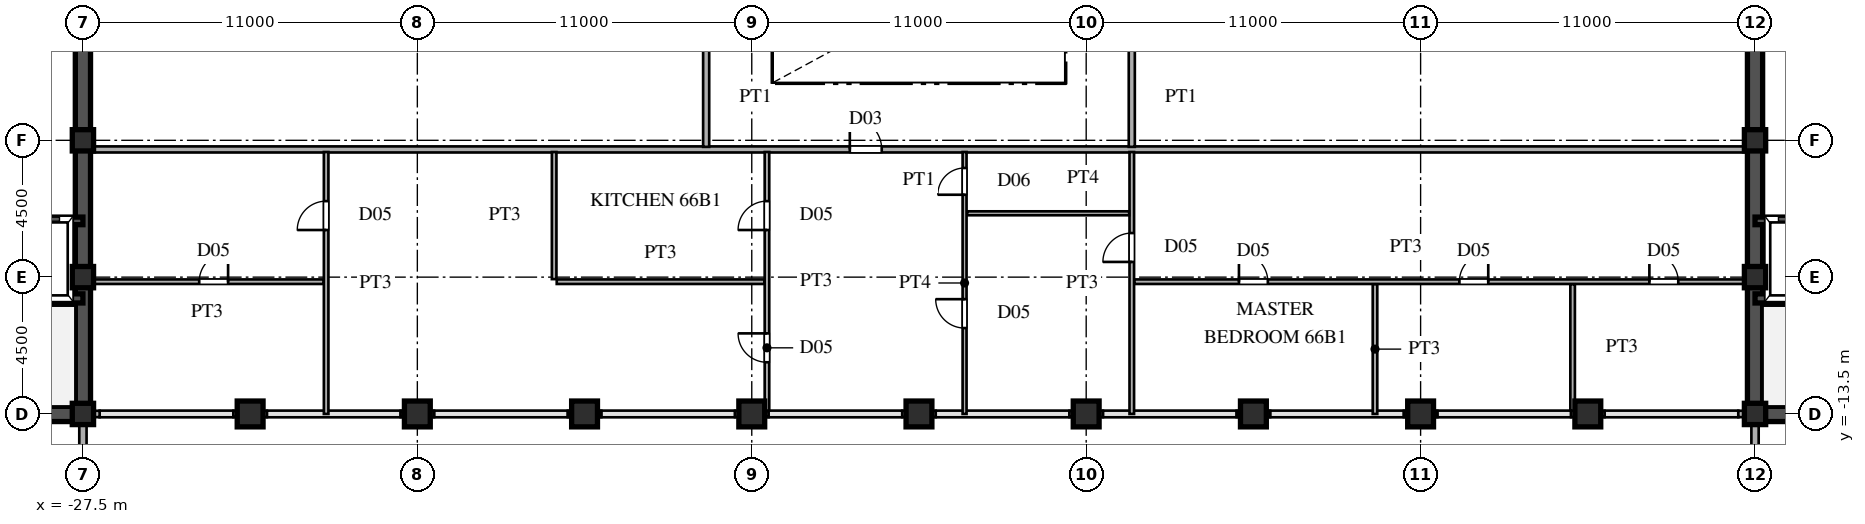
"""IFC4 building model, lengths in metres.
Left out: names, types, materials, properties, quantities, classifications, styles, units other than length and angle.
Written with IfcOpenShell. Run it as: python <this file> out.ifc"""

import sys

from ifc_helpers import new_model, si_unit, direction, frame, frame_2d, origin, origin_2d, place, context, subcontext, project, spatial, rectangle, hollow_rectangle, extrude, source, transform, mapped, element, fill, save


model = new_model("IFC4")
c1 = context("Model", 3, precision=1e-05, world=origin(), true_north=direction((0.0, 1.0)))
c2 = subcontext(c1, "Body", "Model", "MODEL_VIEW")
j1 = project(units=[si_unit("LENGTHUNIT", "METRE"), si_unit("PLANEANGLEUNIT", "RADIAN")], contexts=[c1])
p1 = place(None, origin())
s1 = spatial("IfcSite", under=j1, at=p1, CompositionType="ELEMENT")
p2 = place(p1, origin())
s2 = spatial("IfcBuilding", under=s1, at=p2, CompositionType="ELEMENT")
p3 = place(p2, frame((0.0, 0.0, 250.65)))
s3 = spatial("IfcBuildingStorey", under=s2, at=p3, CompositionType="ELEMENT", Elevation=250.65)
m1 = source(origin(), c2, "Body", "SweptSolid", [
    extrude(hollow_rectangle(XDim=0.7, YDim=0.7, WallThickness=0.03, at=origin_2d()), origin(), (0.0, 0.0, 1.0), 3.75),
])
for number, where, z_axis, x_axis in (
    (1, (-27.5, -13.5, 0.0), (0.0, 0.0, 1.0), (1.0, 0.0, 0.0)),
    (2, (-27.5, -9.0, 0.0), (0.0, 0.0, 1.0), (1.0, 0.0, 0.0)),
    (3, (-27.5, -4.5, 0.0), (0.0, 0.0, 1.0), (1.0, 0.0, 0.0)),
    (4, (27.5, -13.5, 0.0), (0.0, 0.0, 1.0), (1.0, 0.0, 0.0)),
    (5, (27.5, -9.0, 0.0), (0.0, 0.0, 1.0), (1.0, 0.0, 0.0)),
    (6, (27.5, -4.5, 0.0), (0.0, 0.0, 1.0), (1.0, 0.0, 0.0)),
):
    element("IfcColumn", number, at=place(p3, frame(where, z_axis=z_axis, x_axis=x_axis)), inside=s3, PredefinedType="COLUMN", context=c2, shape_type="MappedRepresentation", body=[
        mapped(m1, transform((0.0, 0.0, 0.0), scale=1.0)),
    ])
m2 = source(origin(), c2, "Body", "SweptSolid", [
    extrude(hollow_rectangle(XDim=0.85, YDim=0.85, WallThickness=0.036, at=origin_2d()), origin(), (0.0, 0.0, 1.0), 3.75),
])
for number, where, z_axis, x_axis in (
    (7, (-22.0, -13.5, 0.0), (0.0, 0.0, 1.0), (1.0, 0.0, 0.0)),
    (8, (-16.5, -13.5, 0.0), (0.0, 0.0, 1.0), (1.0, 0.0, 0.0)),
    (9, (-11.0, -13.5, 0.0), (0.0, 0.0, 1.0), (1.0, 0.0, 0.0)),
    (10, (-5.5, -13.5, 0.0), (0.0, 0.0, 1.0), (1.0, 0.0, 0.0)),
    (11, (0.0, -13.5, 0.0), (0.0, 0.0, 1.0), (1.0, 0.0, 0.0)),
    (12, (5.5, -13.5, 0.0), (0.0, 0.0, 1.0), (1.0, 0.0, 0.0)),
    (13, (11.0, -13.5, 0.0), (0.0, 0.0, 1.0), (1.0, 0.0, 0.0)),
    (14, (16.5, -13.5, 0.0), (0.0, 0.0, 1.0), (1.0, 0.0, 0.0)),
    (15, (22.0, -13.5, 0.0), (0.0, 0.0, 1.0), (1.0, 0.0, 0.0)),
):
    element("IfcColumn", number, at=place(p3, frame(where, z_axis=z_axis, x_axis=x_axis)), inside=s3, PredefinedType="COLUMN", context=c2, shape_type="MappedRepresentation", body=[
        mapped(m2, transform((0.0, 0.0, 0.0), scale=1.0)),
    ])
p4 = place(p3, frame((-27.5, -15.98, 0.0), z_axis=(0.0, 0.0, 1.0), x_axis=(0.0, 1.0, 0.0)))
e16 = element("IfcWall", 16, at=p4, inside=s3, PredefinedType="SOLIDWALL", context=c2, shape_type="SweptSolid", body=[
    extrude(rectangle(XDim=1.605, YDim=0.24, at=frame_2d((0.803, 0.0))), origin(), (0.0, 0.0, 1.0), 3.53),
])
p5 = place(p3, frame((-27.5, -14.375, 0.0), z_axis=(0.0, 0.0, 1.0), x_axis=(0.0, 1.0, 0.0)))
e17 = element("IfcWall", 17, at=p5, inside=s3, PredefinedType="SOLIDWALL", context=c2, shape_type="SweptSolid", body=[
    extrude(rectangle(XDim=0.62, YDim=0.24, at=frame_2d((0.31, 0.0))), origin(), (0.0, 0.0, 1.0), 3.03),
])
p6 = place(p3, frame((27.5, -15.98, 0.0), z_axis=(0.0, 0.0, 1.0), x_axis=(0.0, 1.0, 0.0)))
e18 = element("IfcWall", 18, at=p6, inside=s3, PredefinedType="SOLIDWALL", context=c2, shape_type="SweptSolid", body=[
    extrude(rectangle(XDim=1.605, YDim=0.24, at=frame_2d((0.803, 0.0))), origin(), (0.0, 0.0, 1.0), 3.53),
])
p7 = place(p3, frame((27.5, -14.375, 0.0), z_axis=(0.0, 0.0, 1.0), x_axis=(0.0, 1.0, 0.0)))
e19 = element("IfcWall", 19, at=p7, inside=s3, PredefinedType="SOLIDWALL", context=c2, shape_type="SweptSolid", body=[
    extrude(rectangle(XDim=0.62, YDim=0.24, at=frame_2d((0.31, 0.0))), origin(), (0.0, 0.0, 1.0), 3.03),
])
p8 = place(p3, frame((-27.49, -13.5, 0.0), z_axis=(0.0, 0.0, 1.0), x_axis=(1.0, 0.0, 0.0)))
e20 = element("IfcWall", 20, at=p8, inside=s3, PredefinedType="SOLIDWALL", context=c2, shape_type="SweptSolid", body=[
    extrude(rectangle(XDim=0.54, YDim=0.21, at=frame_2d((0.27, 0.0))), origin(), (0.0, 0.0, 1.0), 3.03),
])
for number, where, z_axis, x_axis in (
    (21, (-22.55, -13.5, 0.0), (0.0, 0.0, 1.0), (1.0, 0.0, 0.0)),
    (22, (-17.05, -13.5, 0.0), (0.0, 0.0, 1.0), (1.0, 0.0, 0.0)),
    (23, (-11.55, -13.5, 0.0), (0.0, 0.0, 1.0), (1.0, 0.0, 0.0)),
    (24, (-6.05, -13.5, 0.0), (0.0, 0.0, 1.0), (1.0, 0.0, 0.0)),
    (25, (-0.55, -13.5, 0.0), (0.0, 0.0, 1.0), (1.0, 0.0, 0.0)),
    (26, (4.95, -13.5, 0.0), (0.0, 0.0, 1.0), (1.0, 0.0, 0.0)),
    (27, (10.45, -13.5, 0.0), (0.0, 0.0, 1.0), (1.0, 0.0, 0.0)),
    (28, (15.95, -13.5, 0.0), (0.0, 0.0, 1.0), (1.0, 0.0, 0.0)),
    (29, (21.45, -13.5, 0.0), (0.0, 0.0, 1.0), (1.0, 0.0, 0.0)),
):
    element("IfcWall", number, at=place(p3, frame(where, z_axis=z_axis, x_axis=x_axis)), inside=s3, PredefinedType="SOLIDWALL", context=c2, shape_type="SweptSolid", body=[
        extrude(rectangle(XDim=1.1, YDim=0.21, at=frame_2d((0.55, 0.0))), origin(), (0.0, 0.0, 1.0), 3.03),
    ])
p9 = place(p3, frame((26.95, -13.5, 0.0), z_axis=(0.0, 0.0, 1.0), x_axis=(1.0, 0.0, 0.0)))
e30 = element("IfcWall", 30, at=p9, inside=s3, PredefinedType="SOLIDWALL", context=c2, shape_type="SweptSolid", body=[
    extrude(rectangle(XDim=0.54, YDim=0.21, at=frame_2d((0.27, 0.0))), origin(), (0.0, 0.0, 1.0), 3.03),
])
p10 = place(p3, frame((-27.5, -13.5, 0.0), z_axis=(0.0, 0.0, 1.0), x_axis=(0.0, 1.0, 0.0)))
e31 = element("IfcWall", 31, at=p10, inside=s3, PredefinedType="SHEAR", context=c2, shape_type="SweptSolid", body=[
    extrude(rectangle(XDim=12.2, YDim=0.5, at=frame_2d((6.1, 0.0))), origin(), (0.0, 0.0, 1.0), 3.53),
])
p11 = place(p3, frame((-36.5, -13.5, 0.0), z_axis=(0.0, 0.0, 1.0), x_axis=(1.0, 0.0, 0.0)))
e32 = element("IfcWall", 32, at=p11, inside=s3, PredefinedType="SHEAR", context=c2, shape_type="SweptSolid", body=[
    extrude(rectangle(XDim=9.0, YDim=0.5, at=frame_2d((4.5, 0.0))), origin(), (0.0, 0.0, 1.0), 3.53),
])
p12 = place(p3, frame((-36.5, -9.7, 0.0), z_axis=(0.0, 0.0, 1.0), x_axis=(1.0, 0.0, 0.0)))
e33 = element("IfcWall", 33, at=p12, inside=s3, PredefinedType="SHEAR", context=c2, shape_type="SweptSolid", body=[
    extrude(rectangle(XDim=9.0, YDim=0.3, at=frame_2d((4.5, 0.0))), origin(), (0.0, 0.0, 1.0), 3.53),
])
p13 = place(p12, frame((0.6, 0.0, 0.0)))
e34 = element("IfcOpeningElement", 34, at=p13, cuts=e33, PredefinedType="OPENING", context=c2, shape_type="SweptSolid", body=[
    extrude(rectangle(XDim=1.1, YDim=2.2, at=frame_2d((0.55, 1.1))), frame((0.0, 0.16, 0.0), z_axis=(0.0, -1.0, 0.0), x_axis=(1.0, 0.0, 0.0)), (0.0, 0.0, 1.0), 0.32),
])
p14 = place(p3, frame((-30.3, -7.15, 0.0), z_axis=(0.0, 0.0, 1.0), x_axis=(1.0, 0.0, 0.0)))
e35 = element("IfcWall", 35, at=p14, inside=s3, PredefinedType="SHEAR", context=c2, shape_type="SweptSolid", body=[
    extrude(rectangle(XDim=2.8, YDim=0.25, at=frame_2d((1.4, 0.0))), origin(), (0.0, 0.0, 1.0), 3.53),
])
p15 = place(p3, frame((27.5, -13.5, 0.0), z_axis=(0.0, 0.0, 1.0), x_axis=(0.0, 1.0, 0.0)))
e36 = element("IfcWall", 36, at=p15, inside=s3, PredefinedType="SHEAR", context=c2, shape_type="SweptSolid", body=[
    extrude(rectangle(XDim=12.2, YDim=0.5, at=frame_2d((6.1, 0.0))), origin(), (0.0, 0.0, 1.0), 3.53),
])
p16 = place(p3, frame((27.5, -13.5, 0.0), z_axis=(0.0, 0.0, 1.0), x_axis=(1.0, 0.0, 0.0)))
e37 = element("IfcWall", 37, at=p16, inside=s3, PredefinedType="SHEAR", context=c2, shape_type="SweptSolid", body=[
    extrude(rectangle(XDim=9.0, YDim=0.5, at=frame_2d((4.5, 0.0))), origin(), (0.0, 0.0, 1.0), 3.53),
])
p17 = place(p3, frame((27.5, -9.7, 0.0), z_axis=(0.0, 0.0, 1.0), x_axis=(1.0, 0.0, 0.0)))
e38 = element("IfcWall", 38, at=p17, inside=s3, PredefinedType="SHEAR", context=c2, shape_type="SweptSolid", body=[
    extrude(rectangle(XDim=9.0, YDim=0.3, at=frame_2d((4.5, 0.0))), origin(), (0.0, 0.0, 1.0), 3.53),
])
p18 = place(p17, frame((7.3, 0.0, 0.0)))
e39 = element("IfcOpeningElement", 39, at=p18, cuts=e38, PredefinedType="OPENING", context=c2, shape_type="SweptSolid", body=[
    extrude(rectangle(XDim=1.1, YDim=2.2, at=frame_2d((0.55, 1.1))), frame((0.0, 0.16, 0.0), z_axis=(0.0, -1.0, 0.0), x_axis=(1.0, 0.0, 0.0)), (0.0, 0.0, 1.0), 0.32),
])
p19 = place(p3, frame((27.5, -7.15, 0.0), z_axis=(0.0, 0.0, 1.0), x_axis=(1.0, 0.0, 0.0)))
e40 = element("IfcWall", 40, at=p19, inside=s3, PredefinedType="SHEAR", context=c2, shape_type="SweptSolid", body=[
    extrude(rectangle(XDim=2.8, YDim=0.25, at=frame_2d((1.4, 0.0))), origin(), (0.0, 0.0, 1.0), 3.53),
])
p20 = place(p3, frame((-27.245, -9.15, 0.0), z_axis=(0.0, 0.0, 1.0), x_axis=(1.0, 0.0, 0.0)))
e41 = element("IfcWall", 41, at=p20, inside=s3, PredefinedType="PARTITIONING", context=c2, shape_type="SweptSolid", body=[
    extrude(rectangle(XDim=7.66, YDim=0.15, at=frame_2d((3.83, 0.0))), origin(), (0.0, 0.0, 1.0), 3.53),
])
p21 = place(p20, frame((3.57, 0.0, 0.0)))
e42 = element("IfcOpeningElement", 42, at=p21, cuts=e41, PredefinedType="OPENING", context=c2, shape_type="SweptSolid", body=[
    extrude(rectangle(XDim=0.95, YDim=2.15, at=frame_2d((0.475, 1.075))), frame((0.0, 0.085, 0.0), z_axis=(0.0, -1.0, 0.0), x_axis=(1.0, 0.0, 0.0)), (0.0, 0.0, 1.0), 0.17),
])
p22 = place(p3, frame((-11.915, -9.15, 0.0), z_axis=(0.0, 0.0, 1.0), x_axis=(1.0, 0.0, 0.0)))
e43 = element("IfcWall", 43, at=p22, inside=s3, PredefinedType="PARTITIONING", context=c2, shape_type="SweptSolid", body=[
    extrude(rectangle(XDim=6.83, YDim=0.15, at=frame_2d((3.415, 0.0))), origin(), (0.0, 0.0, 1.0), 3.53),
])
p23 = place(p3, frame((7.085, -9.15, 0.0), z_axis=(0.0, 0.0, 1.0), x_axis=(1.0, 0.0, 0.0)))
e44 = element("IfcWall", 44, at=p23, inside=s3, PredefinedType="PARTITIONING", context=c2, shape_type="SweptSolid", body=[
    extrude(rectangle(XDim=20.16, YDim=0.15, at=frame_2d((10.08, 0.0))), origin(), (0.0, 0.0, 1.0), 3.53),
])
p24 = place(p23, frame((3.44, 0.0, 0.0)))
e45 = element("IfcOpeningElement", 45, at=p24, cuts=e44, PredefinedType="OPENING", context=c2, shape_type="SweptSolid", body=[
    extrude(rectangle(XDim=0.95, YDim=2.15, at=frame_2d((0.475, 1.075))), frame((0.0, 0.085, 0.0), z_axis=(0.0, -1.0, 0.0), x_axis=(1.0, 0.0, 0.0)), (0.0, 0.0, 1.0), 0.17),
])
p25 = place(p23, frame((10.69, 0.0, 0.0)))
e46 = element("IfcOpeningElement", 46, at=p25, cuts=e44, PredefinedType="OPENING", context=c2, shape_type="SweptSolid", body=[
    extrude(rectangle(XDim=0.95, YDim=2.15, at=frame_2d((0.475, 1.075))), frame((0.0, 0.085, 0.0), z_axis=(0.0, -1.0, 0.0), x_axis=(1.0, 0.0, 0.0)), (0.0, 0.0, 1.0), 0.17),
])
p26 = place(p23, frame((16.94, 0.0, 0.0)))
e47 = element("IfcOpeningElement", 47, at=p26, cuts=e44, PredefinedType="OPENING", context=c2, shape_type="SweptSolid", body=[
    extrude(rectangle(XDim=0.95, YDim=2.15, at=frame_2d((0.475, 1.075))), frame((0.0, 0.085, 0.0), z_axis=(0.0, -1.0, 0.0), x_axis=(1.0, 0.0, 0.0)), (0.0, 0.0, 1.0), 0.17),
])
p27 = place(p3, frame((1.585, -6.9, 0.0), z_axis=(0.0, 0.0, 1.0), x_axis=(1.0, 0.0, 0.0)))
e48 = element("IfcWall", 48, at=p27, inside=s3, PredefinedType="PARTITIONING", context=c2, shape_type="SweptSolid", body=[
    extrude(rectangle(XDim=5.33, YDim=0.13, at=frame_2d((2.665, 0.0))), origin(), (0.0, 0.0, 1.0), 3.53),
])
p28 = place(p3, frame((-27.245, -4.8, 0.0), z_axis=(0.0, 0.0, 1.0), x_axis=(1.0, 0.0, 0.0)))
e49 = element("IfcWall", 49, at=p28, inside=s3, PredefinedType="PARTITIONING", context=c2, shape_type="SweptSolid", body=[
    extrude(rectangle(XDim=54.49, YDim=0.2, at=frame_2d((27.245, 0.0))), origin(), (0.0, 0.0, 1.0), 3.53),
])
p29 = place(p28, frame((24.97, 0.0, 0.0)))
e50 = element("IfcOpeningElement", 50, at=p29, cuts=e49, PredefinedType="OPENING", context=c2, shape_type="SweptSolid", body=[
    extrude(rectangle(XDim=1.05, YDim=2.25, at=frame_2d((0.525, 1.125))), frame((0.0, 0.11, 0.0), z_axis=(0.0, -1.0, 0.0), x_axis=(1.0, 0.0, 0.0)), (0.0, 0.0, 1.0), 0.22),
])
p30 = place(p3, frame((-19.5, -13.5, 0.0), z_axis=(0.0, 0.0, 1.0), x_axis=(0.0, 1.0, 0.0)))
e51 = element("IfcWall", 51, at=p30, inside=s3, PredefinedType="PARTITIONING", context=c2, shape_type="SweptSolid", body=[
    extrude(rectangle(XDim=8.615, YDim=0.15, at=frame_2d((4.308, 0.0))), origin(), (0.0, 0.0, 1.0), 3.53),
])
p31 = place(p30, frame((6.05, 0.0, 0.0)))
e52 = element("IfcOpeningElement", 52, at=p31, cuts=e51, PredefinedType="OPENING", context=c2, shape_type="SweptSolid", body=[
    extrude(rectangle(XDim=0.95, YDim=2.15, at=frame_2d((0.475, 1.075))), frame((0.0, 0.085, 0.0), z_axis=(0.0, -1.0, 0.0), x_axis=(1.0, 0.0, 0.0)), (0.0, 0.0, 1.0), 0.17),
])
p32 = place(p3, frame((-12.0, -9.065, 0.0), z_axis=(0.0, 0.0, 1.0), x_axis=(0.0, 1.0, 0.0)))
e53 = element("IfcWall", 53, at=p32, inside=s3, PredefinedType="PARTITIONING", context=c2, shape_type="SweptSolid", body=[
    extrude(rectangle(XDim=4.18, YDim=0.15, at=frame_2d((2.09, 0.0))), origin(), (0.0, 0.0, 1.0), 3.53),
])
p33 = place(p3, frame((-7.0, -4.715, 0.0), z_axis=(0.0, 0.0, 1.0), x_axis=(0.0, 1.0, 0.0)))
e54 = element("IfcWall", 54, at=p33, inside=s3, PredefinedType="PARTITIONING", context=c2, shape_type="SweptSolid", body=[
    extrude(rectangle(XDim=3.28, YDim=0.2, at=frame_2d((1.64, 0.0))), origin(), (0.0, 0.0, 1.0), 3.53),
])
p34 = place(p3, frame((-5.0, -13.39, 0.0), z_axis=(0.0, 0.0, 1.0), x_axis=(0.0, 1.0, 0.0)))
e55 = element("IfcWall", 55, at=p34, inside=s3, PredefinedType="PARTITIONING", context=c2, shape_type="SweptSolid", body=[
    extrude(rectangle(XDim=8.505, YDim=0.15, at=frame_2d((4.252, 0.0))), origin(), (0.0, 0.0, 1.0), 3.53),
])
p35 = place(p34, frame((5.94, 0.0, 0.0)))
e56 = element("IfcOpeningElement", 56, at=p35, cuts=e55, PredefinedType="OPENING", context=c2, shape_type="SweptSolid", body=[
    extrude(rectangle(XDim=0.95, YDim=2.15, at=frame_2d((0.475, 1.075))), frame((0.0, 0.085, 0.0), z_axis=(0.0, -1.0, 0.0), x_axis=(1.0, 0.0, 0.0)), (0.0, 0.0, 1.0), 0.17),
])
p36 = place(p34, frame((1.59, 0.0, 0.0)))
e57 = element("IfcOpeningElement", 57, at=p36, cuts=e55, PredefinedType="OPENING", context=c2, shape_type="SweptSolid", body=[
    extrude(rectangle(XDim=0.95, YDim=2.15, at=frame_2d((0.475, 1.075))), frame((0.0, 0.085, 0.0), z_axis=(0.0, -1.0, 0.0), x_axis=(1.0, 0.0, 0.0)), (0.0, 0.0, 1.0), 0.17),
])
p37 = place(p3, frame((1.5, -13.5, 0.0), z_axis=(0.0, 0.0, 1.0), x_axis=(0.0, 1.0, 0.0)))
e58 = element("IfcWall", 58, at=p37, inside=s3, PredefinedType="PARTITIONING", context=c2, shape_type="SweptSolid", body=[
    extrude(rectangle(XDim=8.615, YDim=0.13, at=frame_2d((4.308, 0.0))), origin(), (0.0, 0.0, 1.0), 3.53),
])
p38 = place(p37, frame((7.21, 0.0, 0.0)))
e59 = element("IfcOpeningElement", 59, at=p38, cuts=e58, PredefinedType="OPENING", context=c2, shape_type="SweptSolid", body=[
    extrude(rectangle(XDim=0.88, YDim=2.1, at=frame_2d((0.44, 1.05))), frame((0.0, 0.075, 0.0), z_axis=(0.0, -1.0, 0.0), x_axis=(1.0, 0.0, 0.0)), (0.0, 0.0, 1.0), 0.15),
])
p39 = place(p37, frame((2.825, 0.0, 0.0)))
e60 = element("IfcOpeningElement", 60, at=p39, cuts=e58, PredefinedType="OPENING", context=c2, shape_type="SweptSolid", body=[
    extrude(rectangle(XDim=0.95, YDim=2.15, at=frame_2d((0.475, 1.075))), frame((0.0, 0.075, 0.0), z_axis=(0.0, -1.0, 0.0), x_axis=(1.0, 0.0, 0.0)), (0.0, 0.0, 1.0), 0.15),
])
p40 = place(p3, frame((7.0, -13.5, 0.0), z_axis=(0.0, 0.0, 1.0), x_axis=(0.0, 1.0, 0.0)))
e61 = element("IfcWall", 61, at=p40, inside=s3, PredefinedType="PARTITIONING", context=c2, shape_type="SweptSolid", body=[
    extrude(rectangle(XDim=8.615, YDim=0.15, at=frame_2d((4.308, 0.0))), origin(), (0.0, 0.0, 1.0), 3.53),
])
p41 = place(p40, frame((5.0, 0.0, 0.0)))
e62 = element("IfcOpeningElement", 62, at=p41, cuts=e61, PredefinedType="OPENING", context=c2, shape_type="SweptSolid", body=[
    extrude(rectangle(XDim=0.95, YDim=2.15, at=frame_2d((0.475, 1.075))), frame((0.0, 0.085, 0.0), z_axis=(0.0, -1.0, 0.0), x_axis=(1.0, 0.0, 0.0)), (0.0, 0.0, 1.0), 0.17),
])
p42 = place(p3, frame((7.0, -4.715, 0.0), z_axis=(0.0, 0.0, 1.0), x_axis=(0.0, 1.0, 0.0)))
e63 = element("IfcWall", 63, at=p42, inside=s3, PredefinedType="PARTITIONING", context=c2, shape_type="SweptSolid", body=[
    extrude(rectangle(XDim=3.28, YDim=0.2, at=frame_2d((1.64, 0.0))), origin(), (0.0, 0.0, 1.0), 3.53),
])
p43 = place(p3, frame((15.0, -13.5, 0.0), z_axis=(0.0, 0.0, 1.0), x_axis=(0.0, 1.0, 0.0)))
e64 = element("IfcWall", 64, at=p43, inside=s3, PredefinedType="PARTITIONING", context=c2, shape_type="SweptSolid", body=[
    extrude(rectangle(XDim=4.265, YDim=0.15, at=frame_2d((2.132, 0.0))), origin(), (0.0, 0.0, 1.0), 3.53),
])
p44 = place(p3, frame((21.5, -13.39, 0.0), z_axis=(0.0, 0.0, 1.0), x_axis=(0.0, 1.0, 0.0)))
e65 = element("IfcWall", 65, at=p44, inside=s3, PredefinedType="PARTITIONING", context=c2, shape_type="SweptSolid", body=[
    extrude(rectangle(XDim=4.155, YDim=0.15, at=frame_2d((2.077, 0.0))), origin(), (0.0, 0.0, 1.0), 3.53),
])
m3 = source(origin(), c2, "Body", "SweptSolid", [
    extrude(rectangle(XDim=0.95, YDim=2.15, at=frame_2d((0.475, 1.075))), frame((0.0, 0.025, 0.0), z_axis=(0.0, -1.0, 0.0), x_axis=(1.0, 0.0, 0.0)), (0.0, 0.0, 1.0), 0.05),
])
p45 = place(p21, origin())
e66 = element("IfcDoor", 66, at=p45, inside=s3, OperationType="SINGLE_SWING_RIGHT", PredefinedType="DOOR", context=c2, shape_type="MappedRepresentation", body=[
    mapped(m3, transform((0.0, 0.0, 0.0), scale=1.0)),
])
fill(e42, e66)
p46 = place(p24, origin())
e67 = element("IfcDoor", 67, at=p46, inside=s3, OperationType="SINGLE_SWING_LEFT", PredefinedType="DOOR", context=c2, shape_type="MappedRepresentation", body=[
    mapped(m3, transform((0.0, 0.0, 0.0), scale=1.0)),
])
fill(e45, e67)
p47 = place(p25, origin())
e68 = element("IfcDoor", 68, at=p47, inside=s3, OperationType="SINGLE_SWING_RIGHT", PredefinedType="DOOR", context=c2, shape_type="MappedRepresentation", body=[
    mapped(m3, transform((0.0, 0.0, 0.0), scale=1.0)),
])
fill(e46, e68)
p48 = place(p26, origin())
e69 = element("IfcDoor", 69, at=p48, inside=s3, OperationType="SINGLE_SWING_LEFT", PredefinedType="DOOR", context=c2, shape_type="MappedRepresentation", body=[
    mapped(m3, transform((0.0, 0.0, 0.0), scale=1.0)),
])
fill(e47, e69)
m4 = source(origin(), c2, "Body", "SweptSolid", [
    extrude(rectangle(XDim=1.05, YDim=2.25, at=frame_2d((0.525, 1.125))), frame((0.0, 0.025, 0.0), z_axis=(0.0, -1.0, 0.0), x_axis=(1.0, 0.0, 0.0)), (0.0, 0.0, 1.0), 0.05),
])
p49 = place(p29, origin())
e70 = element("IfcDoor", 70, at=p49, inside=s3, OperationType="SINGLE_SWING_LEFT", PredefinedType="DOOR", context=c2, shape_type="MappedRepresentation", body=[
    mapped(m4, transform((0.0, 0.0, 0.0), scale=1.0)),
])
fill(e50, e70)
p50 = place(p31, origin())
e71 = element("IfcDoor", 71, at=p50, inside=s3, OperationType="SINGLE_SWING_LEFT", PredefinedType="DOOR", context=c2, shape_type="MappedRepresentation", body=[
    mapped(m3, transform((0.0, 0.0, 0.0), scale=1.0)),
])
fill(e52, e71)
p51 = place(p35, origin())
e72 = element("IfcDoor", 72, at=p51, inside=s3, OperationType="SINGLE_SWING_LEFT", PredefinedType="DOOR", context=c2, shape_type="MappedRepresentation", body=[
    mapped(m3, transform((0.0, 0.0, 0.0), scale=1.0)),
])
fill(e56, e72)
p52 = place(p36, origin())
e73 = element("IfcDoor", 73, at=p52, inside=s3, OperationType="SINGLE_SWING_RIGHT", PredefinedType="DOOR", context=c2, shape_type="MappedRepresentation", body=[
    mapped(m3, transform((0.0, 0.0, 0.0), scale=1.0)),
])
fill(e57, e73)
m5 = source(origin(), c2, "Body", "SweptSolid", [
    extrude(rectangle(XDim=0.88, YDim=2.1, at=frame_2d((0.44, 1.05))), frame((0.0, 0.025, 0.0), z_axis=(0.0, -1.0, 0.0), x_axis=(1.0, 0.0, 0.0)), (0.0, 0.0, 1.0), 0.05),
])
p53 = place(p38, origin())
e74 = element("IfcDoor", 74, at=p53, inside=s3, OperationType="SINGLE_SWING_LEFT", PredefinedType="DOOR", context=c2, shape_type="MappedRepresentation", body=[
    mapped(m5, transform((0.0, 0.0, 0.0), scale=1.0)),
])
fill(e59, e74)
p54 = place(p39, origin())
e75 = element("IfcDoor", 75, at=p54, inside=s3, OperationType="SINGLE_SWING_RIGHT", PredefinedType="DOOR", context=c2, shape_type="MappedRepresentation", body=[
    mapped(m3, transform((0.0, 0.0, 0.0), scale=1.0)),
])
fill(e60, e75)
p55 = place(p41, origin())
e76 = element("IfcDoor", 76, at=p55, inside=s3, OperationType="SINGLE_SWING_LEFT", PredefinedType="DOOR", context=c2, shape_type="MappedRepresentation", body=[
    mapped(m3, transform((0.0, 0.0, 0.0), scale=1.0)),
])
fill(e62, e76)
save(model, sys.argv[1])
